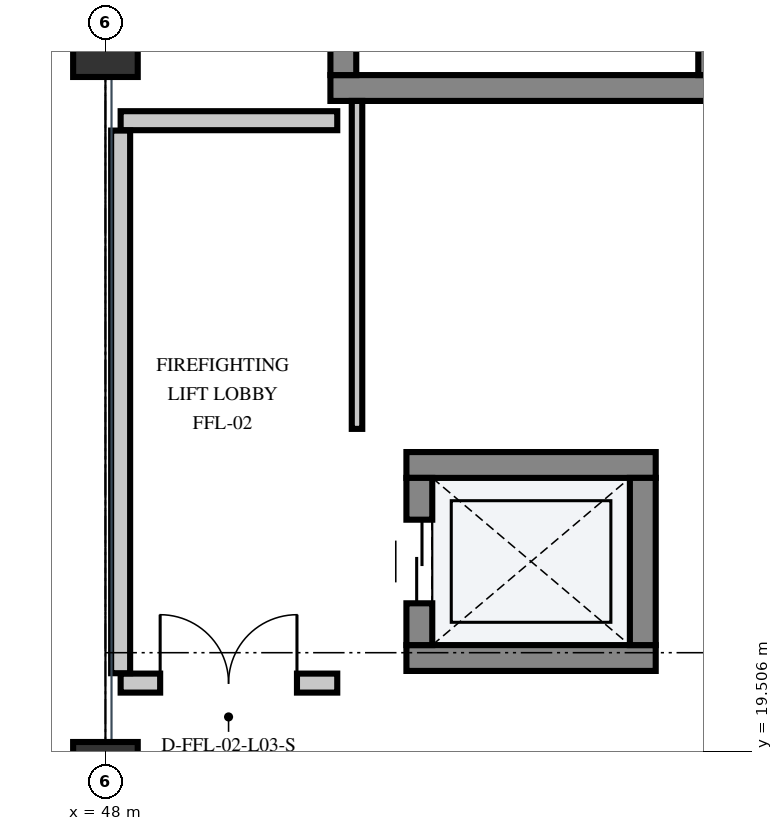
"""IFC4 building model, lengths in metres.
Left out: names, types, materials, properties, quantities, classifications, styles, units other than length and angle.
Written with IfcOpenShell. Run it as: python <this file> out.ifc"""

import sys

from ifc_helpers import new_model, si_unit, direction, frame, frame_2d, origin, origin_2d, place, context, subcontext, project, spatial, rectangle, extrude, element, fill, save


model = new_model("IFC4")
c1 = context("Model", 3, precision=1e-05, world=origin(), true_north=direction((0.0, 1.0)))
c2 = subcontext(c1, "Body", "Model", "MODEL_VIEW")
j1 = project(units=[si_unit("LENGTHUNIT", "METRE"), si_unit("PLANEANGLEUNIT", "RADIAN")], contexts=[c1])
p1 = place(None, origin())
s1 = spatial("IfcSite", under=j1, at=p1, CompositionType="ELEMENT")
p2 = place(p1, origin())
s2 = spatial("IfcBuilding", under=s1, at=p2, CompositionType="ELEMENT")
p3 = place(p2, frame((0.0, 0.0, 15.0)))
s3 = spatial("IfcBuildingStorey", under=s2, at=p3, CompositionType="ELEMENT", Elevation=15.0)
for number, where, z_axis, x_axis in (
    (1, (48.0, 19.2, 0.0), (0.0, 0.0, 1.0), (1.0, 0.0, 0.0)),
    (2, (48.0, 28.8, 0.0), (0.0, 0.0, 1.0), (1.0, 0.0, 0.0)),
):
    element("IfcColumn", number, at=place(p3, frame(where, z_axis=z_axis, x_axis=x_axis)), inside=s3, PredefinedType="COLUMN", context=c2, shape_type="SweptSolid", body=[
        extrude(rectangle(XDim=0.85, YDim=0.85, at=origin_2d()), origin(), (0.0, 0.0, 1.0), 4.8),
    ])
p4 = place(p3, frame((50.96, 28.23, 0.0), z_axis=(0.0, 0.0, 1.0), x_axis=(1.0, 0.0, 0.0)))
e3 = element("IfcWall", 3, at=p4, inside=s3, PredefinedType="SHEAR", context=c2, shape_type="SweptSolid", body=[
    extrude(rectangle(XDim=5.18, YDim=0.34, at=frame_2d((2.59, 0.0))), origin(), (0.0, 0.0, 1.0), 4.52),
])
p5 = place(p3, frame((55.97, 28.4, 0.0), z_axis=(0.0, 0.0, 1.0), x_axis=(0.0, 1.0, 0.0)))
e4 = element("IfcWall", 4, at=p5, inside=s3, PredefinedType="SHEAR", context=c2, shape_type="SweptSolid", body=[
    extrude(rectangle(XDim=8.8, YDim=0.34, at=frame_2d((4.4, 0.0))), origin(), (0.0, 0.0, 1.0), 4.52),
])
p6 = place(p3, frame((51.13, 28.4, 0.0), z_axis=(0.0, 0.0, 1.0), x_axis=(0.0, 1.0, 0.0)))
e5 = element("IfcWall", 5, at=p6, inside=s3, PredefinedType="SHEAR", context=c2, shape_type="SweptSolid", body=[
    extrude(rectangle(XDim=8.8, YDim=0.34, at=frame_2d((4.4, 0.0))), origin(), (0.0, 0.0, 1.0), 4.52),
])
p7 = place(p6, frame((0.45, 0.0, 0.0)))
e6 = element("IfcOpeningElement", 6, at=p7, cuts=e5, PredefinedType="OPENING", context=c2, shape_type="SweptSolid", body=[
    extrude(rectangle(XDim=1.35, YDim=2.2, at=frame_2d((0.675, 1.1))), frame((0.0, 0.182, 0.0), z_axis=(0.0, -1.0, 0.0), x_axis=(1.0, 0.0, 0.0)), (0.0, 0.0, 1.0), 0.364),
])
for number, where, z_axis, x_axis in (
    (7, (51.96, 20.73, 0.0), (0.0, 0.0, 1.0), (1.0, 0.0, 0.0)),
    (8, (51.96, 23.27, 0.0), (0.0, 0.0, 1.0), (1.0, 0.0, 0.0)),
):
    element("IfcWall", number, at=place(p3, frame(where, z_axis=z_axis, x_axis=x_axis)), inside=s3, PredefinedType="SHEAR", context=c2, shape_type="SweptSolid", body=[
        extrude(rectangle(XDim=3.28, YDim=0.34, at=frame_2d((1.64, 0.0))), origin(), (0.0, 0.0, 1.0), 4.52),
    ])
p8 = place(p3, frame((52.13, 20.9, 0.0), z_axis=(0.0, 0.0, 1.0), x_axis=(0.0, 1.0, 0.0)))
e9 = element("IfcWall", 9, at=p8, inside=s3, PredefinedType="SHEAR", context=c2, shape_type="SweptSolid", body=[
    extrude(rectangle(XDim=2.2, YDim=0.34, at=frame_2d((1.1, 0.0))), origin(), (0.0, 0.0, 1.0), 4.52),
])
p9 = place(p8, frame((0.55, 0.0, 0.0)))
e10 = element("IfcOpeningElement", 10, at=p9, cuts=e9, PredefinedType="OPENING", context=c2, shape_type="SweptSolid", body=[
    extrude(rectangle(XDim=1.1, YDim=2.15, at=frame_2d((0.55, 1.075))), frame((0.0, 0.182, 0.0), z_axis=(0.0, -1.0, 0.0), x_axis=(1.0, 0.0, 0.0)), (0.0, 0.0, 1.0), 0.364),
])
p10 = place(p3, frame((55.07, 20.9, 0.0), z_axis=(0.0, 0.0, 1.0), x_axis=(0.0, 1.0, 0.0)))
e11 = element("IfcWall", 11, at=p10, inside=s3, PredefinedType="SHEAR", context=c2, shape_type="SweptSolid", body=[
    extrude(rectangle(XDim=2.2, YDim=0.34, at=frame_2d((1.1, 0.0))), origin(), (0.0, 0.0, 1.0), 4.52),
])
p11 = place(p3, frame((48.2, 20.4, 0.0), z_axis=(0.0, 0.0, 1.0), x_axis=(1.0, 0.0, 0.0)))
e12 = element("IfcWall", 12, at=p11, inside=s3, PredefinedType="PARTITIONING", context=c2, shape_type="SweptSolid", body=[
    extrude(rectangle(XDim=2.85, YDim=0.25, at=frame_2d((1.425, 0.0))), origin(), (0.0, 0.0, 1.0), 3.46),
])
p12 = place(p11, frame((0.52, 0.0, 0.0)))
e13 = element("IfcOpeningElement", 13, at=p12, cuts=e12, PredefinedType="OPENING", context=c2, shape_type="SweptSolid", body=[
    extrude(rectangle(XDim=1.8, YDim=2.25, at=frame_2d((0.9, 1.125))), frame((0.0, 0.137, 0.0), z_axis=(0.0, -1.0, 0.0), x_axis=(1.0, 0.0, 0.0)), (0.0, 0.0, 1.0), 0.274),
])
p13 = place(p3, frame((48.2, 27.8, 0.0), z_axis=(0.0, 0.0, 1.0), x_axis=(1.0, 0.0, 0.0)))
e14 = element("IfcWall", 14, at=p13, inside=s3, PredefinedType="PARTITIONING", context=c2, shape_type="SweptSolid", body=[
    extrude(rectangle(XDim=2.85, YDim=0.25, at=frame_2d((1.425, 0.0))), origin(), (0.0, 0.0, 1.0), 3.46),
])
p14 = place(p3, frame((48.2, 20.53, 0.0), z_axis=(0.0, 0.0, 1.0), x_axis=(0.0, 1.0, 0.0)))
e15 = element("IfcWall", 15, at=p14, inside=s3, PredefinedType="PARTITIONING", context=c2, shape_type="SweptSolid", body=[
    extrude(rectangle(XDim=7.14, YDim=0.25, at=frame_2d((3.57, 0.0))), origin(), (0.0, 0.0, 1.0), 3.46),
])
p15 = place(p3, frame((51.31, 23.745, 0.0), z_axis=(0.0, 0.0, 1.0), x_axis=(0.0, 1.0, 0.0)))
e16 = element("IfcWall", 16, at=p15, inside=s3, PredefinedType="PARTITIONING", context=c2, shape_type="SweptSolid", body=[
    extrude(rectangle(XDim=4.315, YDim=0.138, at=frame_2d((2.158, 0.0))), origin(), (0.0, 0.0, 1.0), 4.52),
])
p16 = place(p9, origin())
e17 = element("IfcDoor", 17, at=p16, inside=s3, OperationType="DOUBLE_DOOR_SLIDING", PredefinedType="DOOR", context=c2, shape_type="SweptSolid", body=[
    extrude(rectangle(XDim=1.1, YDim=2.15, at=frame_2d((0.55, 1.075))), frame((0.0, 0.025, 0.0), z_axis=(0.0, -1.0, 0.0), x_axis=(1.0, 0.0, 0.0)), (0.0, 0.0, 1.0), 0.05),
])
fill(e10, e17)
p17 = place(p12, origin())
e18 = element("IfcDoor", 18, at=p17, inside=s3, OperationType="DOUBLE_DOOR_SINGLE_SWING", PredefinedType="DOOR", context=c2, shape_type="SweptSolid", body=[
    extrude(rectangle(XDim=1.8, YDim=2.25, at=frame_2d((0.9, 1.125))), frame((0.0, 0.025, 0.0), z_axis=(0.0, -1.0, 0.0), x_axis=(1.0, 0.0, 0.0)), (0.0, 0.0, 1.0), 0.05),
])
fill(e13, e18)
save(model, sys.argv[1])
